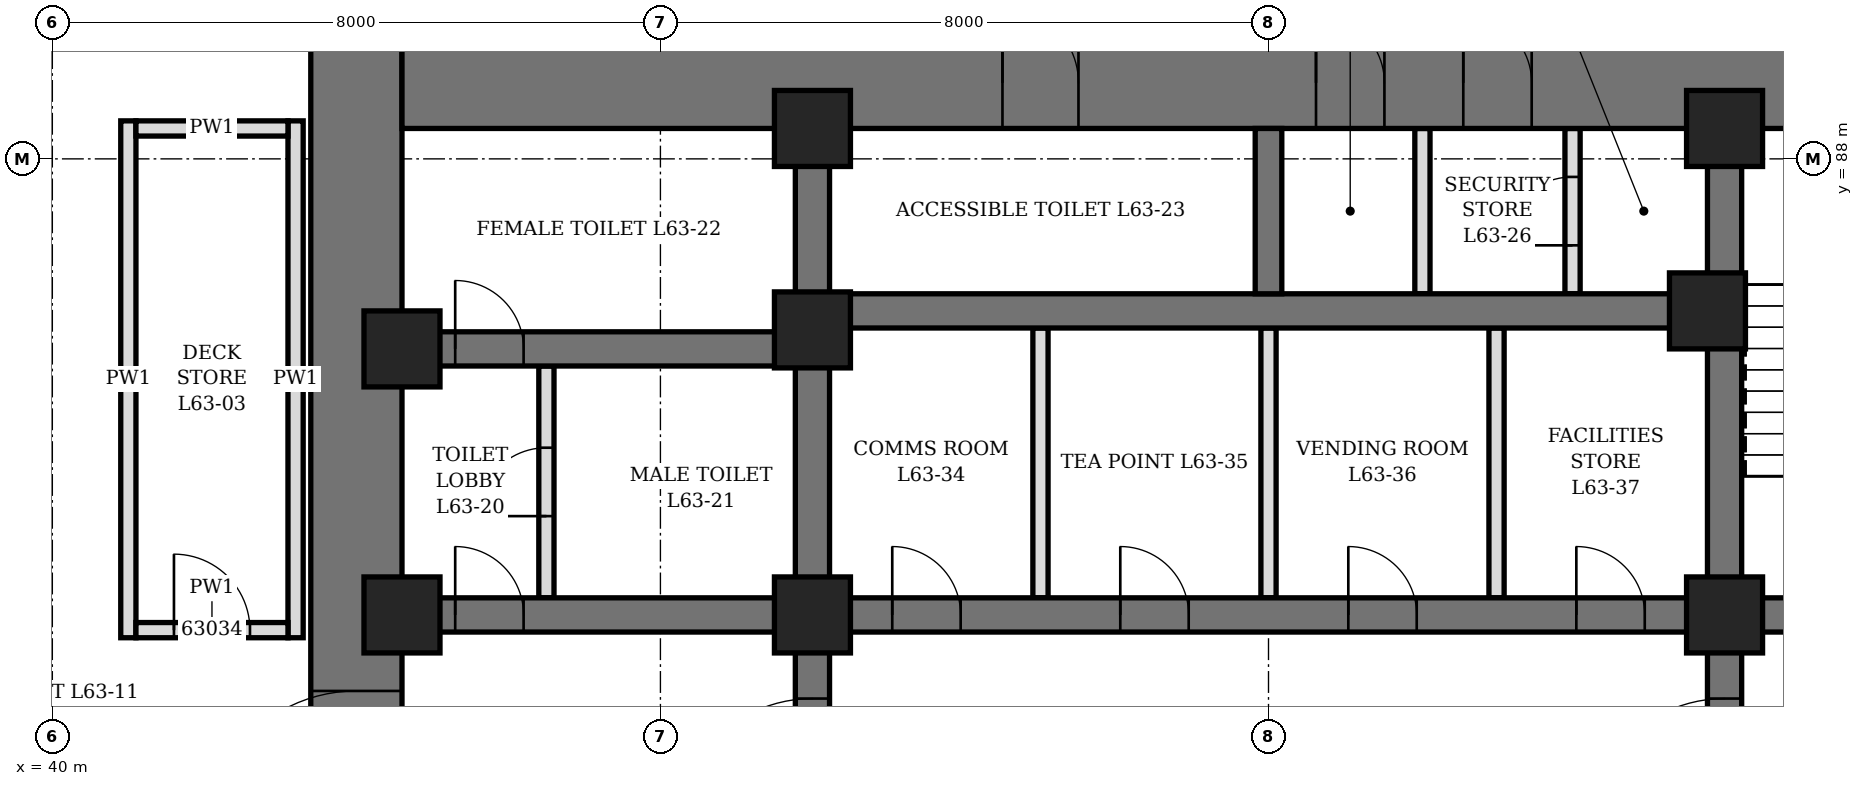
"""IFC4 building model, lengths in metres.
Left out: names, types, materials, properties, quantities, classifications, styles, units other than length and angle.
Written with IfcOpenShell. Run it as: python <this file> out.ifc"""

import sys

from ifc_helpers import new_model, si_unit, direction, frame, frame_2d, origin, origin_2d, place, context, subcontext, project, spatial, rectangle, hollow_rectangle, extrude, element, fill, save


model = new_model("IFC4")
c1 = context("Model", 3, precision=1e-05, world=origin(), true_north=direction((0.0, 1.0)))
c2 = subcontext(c1, "Body", "Model", "MODEL_VIEW")
j1 = project(units=[si_unit("LENGTHUNIT", "METRE"), si_unit("PLANEANGLEUNIT", "RADIAN")], contexts=[c1])
p1 = place(None, origin())
s1 = spatial("IfcSite", under=j1, at=p1, CompositionType="ELEMENT")
p2 = place(p1, origin())
s2 = spatial("IfcBuilding", under=s1, at=p2, CompositionType="ELEMENT")
p3 = place(p2, frame((0.0, 0.0, 279.7)))
s3 = spatial("IfcBuildingStorey", under=s2, at=p3, CompositionType="ELEMENT", Elevation=279.7)
p4 = place(p3, frame((44.0, 70.4, 0.0), z_axis=(0.0, 0.0, 1.0), x_axis=(0.0, 1.0, 0.0)))
e1 = element("IfcWall", 1, at=p4, inside=s3, PredefinedType="SHEAR", context=c2, shape_type="SweptSolid", body=[
    extrude(rectangle(XDim=19.2, YDim=1.2, at=frame_2d((9.6, 0.0))), origin(), (0.0, 0.0, 1.0), 6.0),
])
p5 = place(p4, frame((8.6, 0.0, 0.0)))
e2 = element("IfcOpeningElement", 2, at=p5, cuts=e1, PredefinedType="OPENING", context=c2, shape_type="SweptSolid", body=[
    extrude(rectangle(XDim=2.0, YDim=2.4, at=frame_2d((1.0, 1.2))), frame((0.0, 0.61, 0.0), z_axis=(0.0, -1.0, 0.0), x_axis=(1.0, 0.0, 0.0)), (0.0, 0.0, 1.0), 1.22),
])
p6 = place(p3, frame((44.6, 89.0, 0.0), z_axis=(0.0, 0.0, 1.0), x_axis=(1.0, 0.0, 0.0)))
e3 = element("IfcWall", 3, at=p6, inside=s3, PredefinedType="SHEAR", context=c2, shape_type="SweptSolid", body=[
    extrude(rectangle(XDim=22.8, YDim=1.2, at=frame_2d((11.4, 0.0))), origin(), (0.0, 0.0, 1.0), 6.0),
])
p7 = place(p6, frame((7.9, 0.0, 0.0)))
e4 = element("IfcOpeningElement", 4, at=p7, cuts=e3, PredefinedType="OPENING", context=c2, shape_type="SweptSolid", body=[
    extrude(rectangle(XDim=1.0, YDim=2.1, at=frame_2d((0.5, 1.05))), frame((0.0, 0.61, 0.0), z_axis=(0.0, -1.0, 0.0), x_axis=(1.0, 0.0, 0.0)), (0.0, 0.0, 1.0), 1.22),
])
p8 = place(p6, frame((12.025, 0.0, 0.0)))
e5 = element("IfcOpeningElement", 5, at=p8, cuts=e3, PredefinedType="OPENING", context=c2, shape_type="SweptSolid", body=[
    extrude(rectangle(XDim=0.9, YDim=2.1, at=frame_2d((0.45, 1.05))), frame((0.0, 0.61, 0.0), z_axis=(0.0, -1.0, 0.0), x_axis=(1.0, 0.0, 0.0)), (0.0, 0.0, 1.0), 1.22),
])
p9 = place(p6, frame((13.962, 0.0, 0.0)))
e6 = element("IfcOpeningElement", 6, at=p9, cuts=e3, PredefinedType="OPENING", context=c2, shape_type="SweptSolid", body=[
    extrude(rectangle(XDim=0.9, YDim=2.1, at=frame_2d((0.45, 1.05))), frame((0.0, 0.61, 0.0), z_axis=(0.0, -1.0, 0.0), x_axis=(1.0, 0.0, 0.0)), (0.0, 0.0, 1.0), 1.22),
])
p10 = place(p3, frame((50.0, 71.6, 0.0), z_axis=(0.0, 0.0, 1.0), x_axis=(0.0, 1.0, 0.0)))
e7 = element("IfcWall", 7, at=p10, inside=s3, PredefinedType="SHEAR", context=c2, shape_type="SweptSolid", body=[
    extrude(rectangle(XDim=16.8, YDim=0.45, at=frame_2d((8.4, 0.0))), origin(), (0.0, 0.0, 1.0), 6.0),
])
p11 = place(p10, frame((7.5, 0.0, 0.0)))
e8 = element("IfcOpeningElement", 8, at=p11, cuts=e7, PredefinedType="OPENING", context=c2, shape_type="SweptSolid", body=[
    extrude(rectangle(XDim=1.8, YDim=2.4, at=frame_2d((0.9, 1.2))), frame((0.0, 0.235, 0.0), z_axis=(0.0, -1.0, 0.0), x_axis=(1.0, 0.0, 0.0)), (0.0, 0.0, 1.0), 0.47),
])
p12 = place(p3, frame((62.0, 71.6, 0.0), z_axis=(0.0, 0.0, 1.0), x_axis=(0.0, 1.0, 0.0)))
e9 = element("IfcWall", 9, at=p12, inside=s3, PredefinedType="SHEAR", context=c2, shape_type="SweptSolid", body=[
    extrude(rectangle(XDim=16.8, YDim=0.45, at=frame_2d((8.4, 0.0))), origin(), (0.0, 0.0, 1.0), 6.0),
])
p13 = place(p12, frame((7.5, 0.0, 0.0)))
e10 = element("IfcOpeningElement", 10, at=p13, cuts=e9, PredefinedType="OPENING", context=c2, shape_type="SweptSolid", body=[
    extrude(rectangle(XDim=1.8, YDim=2.4, at=frame_2d((0.9, 1.2))), frame((0.0, 0.235, 0.0), z_axis=(0.0, -1.0, 0.0), x_axis=(1.0, 0.0, 0.0)), (0.0, 0.0, 1.0), 0.47),
])
p14 = place(p3, frame((44.6, 82.0, 0.0), z_axis=(0.0, 0.0, 1.0), x_axis=(1.0, 0.0, 0.0)))
e11 = element("IfcWall", 11, at=p14, inside=s3, PredefinedType="SHEAR", context=c2, shape_type="SweptSolid", body=[
    extrude(rectangle(XDim=5.175, YDim=0.45, at=frame_2d((2.587, 0.0))), origin(), (0.0, 0.0, 1.0), 6.0),
])
p15 = place(p14, frame((0.7, 0.0, 0.0)))
e12 = element("IfcOpeningElement", 12, at=p15, cuts=e11, PredefinedType="OPENING", context=c2, shape_type="SweptSolid", body=[
    extrude(rectangle(XDim=0.9, YDim=2.1, at=frame_2d((0.45, 1.05))), frame((0.0, 0.235, 0.0), z_axis=(0.0, -1.0, 0.0), x_axis=(1.0, 0.0, 0.0)), (0.0, 0.0, 1.0), 0.47),
])
p16 = place(p3, frame((44.6, 85.5, 0.0), z_axis=(0.0, 0.0, 1.0), x_axis=(1.0, 0.0, 0.0)))
e13 = element("IfcWall", 13, at=p16, inside=s3, PredefinedType="SHEAR", context=c2, shape_type="SweptSolid", body=[
    extrude(rectangle(XDim=5.175, YDim=0.45, at=frame_2d((2.587, 0.0))), origin(), (0.0, 0.0, 1.0), 6.0),
])
p17 = place(p16, frame((0.7, 0.0, 0.0)))
e14 = element("IfcOpeningElement", 14, at=p17, cuts=e13, PredefinedType="OPENING", context=c2, shape_type="SweptSolid", body=[
    extrude(rectangle(XDim=0.9, YDim=2.1, at=frame_2d((0.45, 1.05))), frame((0.0, 0.235, 0.0), z_axis=(0.0, -1.0, 0.0), x_axis=(1.0, 0.0, 0.0)), (0.0, 0.0, 1.0), 0.47),
])
p18 = place(p3, frame((62.225, 82.0, 0.0), z_axis=(0.0, 0.0, 1.0), x_axis=(1.0, 0.0, 0.0)))
e15 = element("IfcWall", 15, at=p18, inside=s3, PredefinedType="SHEAR", context=c2, shape_type="SweptSolid", body=[
    extrude(rectangle(XDim=5.175, YDim=0.45, at=frame_2d((2.587, 0.0))), origin(), (0.0, 0.0, 1.0), 6.0),
])
p19 = place(p18, frame((2.175, 0.0, 0.0)))
e16 = element("IfcOpeningElement", 16, at=p19, cuts=e15, PredefinedType="OPENING", context=c2, shape_type="SweptSolid", body=[
    extrude(rectangle(XDim=1.2, YDim=2.1, at=frame_2d((0.6, 1.05))), frame((0.0, 0.235, 0.0), z_axis=(0.0, -1.0, 0.0), x_axis=(1.0, 0.0, 0.0)), (0.0, 0.0, 1.0), 0.47),
])
p20 = place(p3, frame((50.225, 82.0, 0.0), z_axis=(0.0, 0.0, 1.0), x_axis=(1.0, 0.0, 0.0)))
e17 = element("IfcWall", 17, at=p20, inside=s3, PredefinedType="SHEAR", context=c2, shape_type="SweptSolid", body=[
    extrude(rectangle(XDim=11.55, YDim=0.45, at=frame_2d((5.775, 0.0))), origin(), (0.0, 0.0, 1.0), 6.0),
])
p21 = place(p20, frame((0.825, 0.0, 0.0)))
e18 = element("IfcOpeningElement", 18, at=p21, cuts=e17, PredefinedType="OPENING", context=c2, shape_type="SweptSolid", body=[
    extrude(rectangle(XDim=0.9, YDim=2.1, at=frame_2d((0.45, 1.05))), frame((0.0, 0.235, 0.0), z_axis=(0.0, -1.0, 0.0), x_axis=(1.0, 0.0, 0.0)), (0.0, 0.0, 1.0), 0.47),
])
p22 = place(p20, frame((3.825, 0.0, 0.0)))
e19 = element("IfcOpeningElement", 19, at=p22, cuts=e17, PredefinedType="OPENING", context=c2, shape_type="SweptSolid", body=[
    extrude(rectangle(XDim=0.9, YDim=2.1, at=frame_2d((0.45, 1.05))), frame((0.0, 0.235, 0.0), z_axis=(0.0, -1.0, 0.0), x_axis=(1.0, 0.0, 0.0)), (0.0, 0.0, 1.0), 0.47),
])
p23 = place(p20, frame((6.825, 0.0, 0.0)))
e20 = element("IfcOpeningElement", 20, at=p23, cuts=e17, PredefinedType="OPENING", context=c2, shape_type="SweptSolid", body=[
    extrude(rectangle(XDim=0.9, YDim=2.1, at=frame_2d((0.45, 1.05))), frame((0.0, 0.235, 0.0), z_axis=(0.0, -1.0, 0.0), x_axis=(1.0, 0.0, 0.0)), (0.0, 0.0, 1.0), 0.47),
])
p24 = place(p20, frame((9.825, 0.0, 0.0)))
e21 = element("IfcOpeningElement", 21, at=p24, cuts=e17, PredefinedType="OPENING", context=c2, shape_type="SweptSolid", body=[
    extrude(rectangle(XDim=0.9, YDim=2.1, at=frame_2d((0.45, 1.05))), frame((0.0, 0.235, 0.0), z_axis=(0.0, -1.0, 0.0), x_axis=(1.0, 0.0, 0.0)), (0.0, 0.0, 1.0), 0.47),
])
p25 = place(p3, frame((50.225, 86.0, 0.0), z_axis=(0.0, 0.0, 1.0), x_axis=(1.0, 0.0, 0.0)))
e22 = element("IfcWall", 22, at=p25, inside=s3, PredefinedType="SHEAR", context=c2, shape_type="SweptSolid", body=[
    extrude(rectangle(XDim=11.55, YDim=0.45, at=frame_2d((5.775, 0.0))), origin(), (0.0, 0.0, 1.0), 6.0),
])
p26 = place(p3, frame((56.0, 86.225, 0.0), z_axis=(0.0, 0.0, 1.0), x_axis=(0.0, 1.0, 0.0)))
e23 = element("IfcWall", 23, at=p26, inside=s3, PredefinedType="SHEAR", context=c2, shape_type="SweptSolid", body=[
    extrude(rectangle(XDim=2.175, YDim=0.35, at=frame_2d((1.087, 0.0))), origin(), (0.0, 0.0, 1.0), 6.0),
])
for number, where, z_axis, x_axis in (
    (24, (44.6, 82.0, 0.0), (0.0, 0.0, 1.0), (1.0, 0.0, 0.0)),
    (25, (44.6, 85.5, 0.0), (0.0, 0.0, 1.0), (1.0, 0.0, 0.0)),
    (26, (50.0, 82.0, 0.0), (0.0, 0.0, 1.0), (1.0, 0.0, 0.0)),
    (27, (50.0, 85.75, 0.0), (0.0, 0.0, 1.0), (1.0, 0.0, 0.0)),
    (28, (50.0, 88.4, 0.0), (0.0, 0.0, 1.0), (1.0, 0.0, 0.0)),
    (29, (61.775, 86.0, 0.0), (0.0, 0.0, 1.0), (1.0, 0.0, 0.0)),
    (30, (62.0, 82.0, 0.0), (0.0, 0.0, 1.0), (1.0, 0.0, 0.0)),
    (31, (62.0, 88.4, 0.0), (0.0, 0.0, 1.0), (1.0, 0.0, 0.0)),
):
    element("IfcColumn", number, at=place(p3, frame(where, z_axis=z_axis, x_axis=x_axis)), inside=s3, PredefinedType="COLUMN", context=c2, shape_type="SweptSolid", body=[
        extrude(hollow_rectangle(XDim=1.0, YDim=1.0, WallThickness=0.15, at=origin_2d()), origin(), (0.0, 0.0, 1.0), 6.0),
    ])
p27 = place(p3, frame((46.5, 82.225, 0.0), z_axis=(0.0, 0.0, 1.0), x_axis=(0.0, 1.0, 0.0)))
e32 = element("IfcWall", 32, at=p27, inside=s3, PredefinedType="PARTITIONING", context=c2, shape_type="SweptSolid", body=[
    extrude(rectangle(XDim=3.05, YDim=0.2, at=frame_2d((1.525, 0.0))), origin(), (0.0, 0.0, 1.0), 5.75),
])
p28 = place(p27, frame((1.075, 0.0, 0.0)))
e33 = element("IfcOpeningElement", 33, at=p28, cuts=e32, PredefinedType="OPENING", context=c2, shape_type="SweptSolid", body=[
    extrude(rectangle(XDim=0.9, YDim=2.1, at=frame_2d((0.45, 1.05))), frame((0.0, 0.11, 0.0), z_axis=(0.0, -1.0, 0.0), x_axis=(1.0, 0.0, 0.0)), (0.0, 0.0, 1.0), 0.22),
])
p29 = place(p3, frame((60.0, 86.225, 0.0), z_axis=(0.0, 0.0, 1.0), x_axis=(0.0, 1.0, 0.0)))
e34 = element("IfcWall", 34, at=p29, inside=s3, PredefinedType="PARTITIONING", context=c2, shape_type="SweptSolid", body=[
    extrude(rectangle(XDim=2.175, YDim=0.2, at=frame_2d((1.087, 0.0))), origin(), (0.0, 0.0, 1.0), 5.75),
])
p30 = place(p29, frame((0.637, 0.0, 0.0)))
e35 = element("IfcOpeningElement", 35, at=p30, cuts=e34, PredefinedType="OPENING", context=c2, shape_type="SweptSolid", body=[
    extrude(rectangle(XDim=0.9, YDim=2.1, at=frame_2d((0.45, 1.05))), frame((0.0, 0.11, 0.0), z_axis=(0.0, -1.0, 0.0), x_axis=(1.0, 0.0, 0.0)), (0.0, 0.0, 1.0), 0.22),
])
p31 = place(p3, frame((58.025, 86.225, 0.0), z_axis=(0.0, 0.0, 1.0), x_axis=(0.0, 1.0, 0.0)))
e36 = element("IfcWall", 36, at=p31, inside=s3, PredefinedType="PARTITIONING", context=c2, shape_type="SweptSolid", body=[
    extrude(rectangle(XDim=2.175, YDim=0.2, at=frame_2d((1.087, 0.0))), origin(), (0.0, 0.0, 1.0), 5.75),
])
p32 = place(p3, frame((53.0, 82.225, 0.0), z_axis=(0.0, 0.0, 1.0), x_axis=(0.0, 1.0, 0.0)))
e37 = element("IfcWall", 37, at=p32, inside=s3, PredefinedType="PARTITIONING", context=c2, shape_type="SweptSolid", body=[
    extrude(rectangle(XDim=3.55, YDim=0.2, at=frame_2d((1.775, 0.0))), origin(), (0.0, 0.0, 1.0), 5.75),
])
p33 = place(p3, frame((56.0, 82.225, 0.0), z_axis=(0.0, 0.0, 1.0), x_axis=(0.0, 1.0, 0.0)))
e38 = element("IfcWall", 38, at=p33, inside=s3, PredefinedType="PARTITIONING", context=c2, shape_type="SweptSolid", body=[
    extrude(rectangle(XDim=3.55, YDim=0.2, at=frame_2d((1.775, 0.0))), origin(), (0.0, 0.0, 1.0), 4.25),
])
p34 = place(p3, frame((59.0, 82.225, 0.0), z_axis=(0.0, 0.0, 1.0), x_axis=(0.0, 1.0, 0.0)))
e39 = element("IfcWall", 39, at=p34, inside=s3, PredefinedType="PARTITIONING", context=c2, shape_type="SweptSolid", body=[
    extrude(rectangle(XDim=3.55, YDim=0.2, at=frame_2d((1.775, 0.0))), origin(), (0.0, 0.0, 1.0), 5.75),
])
for number, where, z_axis, x_axis in (
    (40, (41.0, 81.7, 0.0), (0.0, 0.0, 1.0), (0.0, 1.0, 0.0)),
    (41, (43.2, 81.7, 0.0), (0.0, 0.0, 1.0), (0.0, 1.0, 0.0)),
):
    element("IfcWall", number, at=place(p3, frame(where, z_axis=z_axis, x_axis=x_axis)), inside=s3, PredefinedType="PARTITIONING", context=c2, shape_type="SweptSolid", body=[
        extrude(rectangle(XDim=6.8, YDim=0.2, at=frame_2d((3.4, 0.0))), origin(), (0.0, 0.0, 1.0), 5.75),
    ])
p35 = place(p3, frame((41.1, 81.8, 0.0), z_axis=(0.0, 0.0, 1.0), x_axis=(1.0, 0.0, 0.0)))
e42 = element("IfcWall", 42, at=p35, inside=s3, PredefinedType="PARTITIONING", context=c2, shape_type="SweptSolid", body=[
    extrude(rectangle(XDim=2.0, YDim=0.2, at=frame_2d((1.0, 0.0))), origin(), (0.0, 0.0, 1.0), 5.75),
])
p36 = place(p35, frame((0.5, 0.0, 0.0)))
e43 = element("IfcOpeningElement", 43, at=p36, cuts=e42, PredefinedType="OPENING", context=c2, shape_type="SweptSolid", body=[
    extrude(rectangle(XDim=1.0, YDim=2.1, at=frame_2d((0.5, 1.05))), frame((0.0, 0.11, 0.0), z_axis=(0.0, -1.0, 0.0), x_axis=(1.0, 0.0, 0.0)), (0.0, 0.0, 1.0), 0.22),
])
p37 = place(p3, frame((41.1, 88.4, 0.0), z_axis=(0.0, 0.0, 1.0), x_axis=(1.0, 0.0, 0.0)))
e44 = element("IfcWall", 44, at=p37, inside=s3, PredefinedType="PARTITIONING", context=c2, shape_type="SweptSolid", body=[
    extrude(rectangle(XDim=2.0, YDim=0.2, at=frame_2d((1.0, 0.0))), origin(), (0.0, 0.0, 1.0), 5.75),
])
p38 = place(p15, origin())
e45 = element("IfcDoor", 45, at=p38, inside=s3, OperationType="SINGLE_SWING_LEFT", PredefinedType="DOOR", context=c2, shape_type="SweptSolid", body=[
    extrude(rectangle(XDim=0.9, YDim=2.1, at=frame_2d((0.45, 1.05))), frame((0.0, 0.225, 0.0), z_axis=(0.0, -1.0, 0.0), x_axis=(1.0, 0.0, 0.0)), (0.0, 0.0, 1.0), 0.449),
])
fill(e12, e45)
p39 = place(p28, origin())
e46 = element("IfcDoor", 46, at=p39, inside=s3, OperationType="SINGLE_SWING_RIGHT", PredefinedType="DOOR", context=c2, shape_type="SweptSolid", body=[
    extrude(rectangle(XDim=0.9, YDim=2.1, at=frame_2d((0.45, 1.05))), frame((0.0, 0.1, 0.0), z_axis=(0.0, -1.0, 0.0), x_axis=(1.0, 0.0, 0.0)), (0.0, 0.0, 1.0), 0.199),
])
fill(e33, e46)
p40 = place(p17, origin())
e47 = element("IfcDoor", 47, at=p40, inside=s3, OperationType="SINGLE_SWING_RIGHT", PredefinedType="DOOR", context=c2, shape_type="SweptSolid", body=[
    extrude(rectangle(XDim=0.9, YDim=2.1, at=frame_2d((0.45, 1.05))), frame((0.0, 0.225, 0.0), z_axis=(0.0, -1.0, 0.0), x_axis=(1.0, 0.0, 0.0)), (0.0, 0.0, 1.0), 0.449),
])
fill(e14, e47)
p41 = place(p7, origin())
e48 = element("IfcDoor", 48, at=p41, inside=s3, OperationType="SINGLE_SWING_LEFT", PredefinedType="DOOR", context=c2, shape_type="SweptSolid", body=[
    extrude(rectangle(XDim=1.0, YDim=2.1, at=frame_2d((0.5, 1.05))), frame((0.0, 0.35, 0.0), z_axis=(0.0, -1.0, 0.0), x_axis=(1.0, 0.0, 0.0)), (0.0, 0.0, 1.0), 0.7),
])
fill(e4, e48)
p42 = place(p8, origin())
e49 = element("IfcDoor", 49, at=p42, inside=s3, OperationType="SINGLE_SWING_LEFT", PredefinedType="DOOR", context=c2, shape_type="SweptSolid", body=[
    extrude(rectangle(XDim=0.9, YDim=2.1, at=frame_2d((0.45, 1.05))), frame((0.0, 0.35, 0.0), z_axis=(0.0, -1.0, 0.0), x_axis=(1.0, 0.0, 0.0)), (0.0, 0.0, 1.0), 0.7),
])
fill(e5, e49)
p43 = place(p9, origin())
e50 = element("IfcDoor", 50, at=p43, inside=s3, OperationType="SINGLE_SWING_LEFT", PredefinedType="DOOR", context=c2, shape_type="SweptSolid", body=[
    extrude(rectangle(XDim=0.9, YDim=2.1, at=frame_2d((0.45, 1.05))), frame((0.0, 0.35, 0.0), z_axis=(0.0, -1.0, 0.0), x_axis=(1.0, 0.0, 0.0)), (0.0, 0.0, 1.0), 0.7),
])
fill(e6, e50)
p44 = place(p30, origin())
e51 = element("IfcDoor", 51, at=p44, inside=s3, OperationType="SINGLE_SWING_LEFT", PredefinedType="DOOR", context=c2, shape_type="SweptSolid", body=[
    extrude(rectangle(XDim=0.9, YDim=2.1, at=frame_2d((0.45, 1.05))), frame((0.0, 0.1, 0.0), z_axis=(0.0, -1.0, 0.0), x_axis=(1.0, 0.0, 0.0)), (0.0, 0.0, 1.0), 0.199),
])
fill(e35, e51)
p45 = place(p21, origin())
e52 = element("IfcDoor", 52, at=p45, inside=s3, OperationType="SINGLE_SWING_LEFT", PredefinedType="DOOR", context=c2, shape_type="SweptSolid", body=[
    extrude(rectangle(XDim=0.9, YDim=2.1, at=frame_2d((0.45, 1.05))), frame((0.0, 0.225, 0.0), z_axis=(0.0, -1.0, 0.0), x_axis=(1.0, 0.0, 0.0)), (0.0, 0.0, 1.0), 0.449),
])
fill(e18, e52)
p46 = place(p22, origin())
e53 = element("IfcDoor", 53, at=p46, inside=s3, OperationType="SINGLE_SWING_LEFT", PredefinedType="DOOR", context=c2, shape_type="SweptSolid", body=[
    extrude(rectangle(XDim=0.9, YDim=2.1, at=frame_2d((0.45, 1.05))), frame((0.0, 0.225, 0.0), z_axis=(0.0, -1.0, 0.0), x_axis=(1.0, 0.0, 0.0)), (0.0, 0.0, 1.0), 0.449),
])
fill(e19, e53)
p47 = place(p23, origin())
e54 = element("IfcDoor", 54, at=p47, inside=s3, OperationType="SINGLE_SWING_LEFT", PredefinedType="DOOR", context=c2, shape_type="SweptSolid", body=[
    extrude(rectangle(XDim=0.9, YDim=2.1, at=frame_2d((0.45, 1.05))), frame((0.0, 0.225, 0.0), z_axis=(0.0, -1.0, 0.0), x_axis=(1.0, 0.0, 0.0)), (0.0, 0.0, 1.0), 0.449),
])
fill(e20, e54)
p48 = place(p24, origin())
e55 = element("IfcDoor", 55, at=p48, inside=s3, OperationType="SINGLE_SWING_LEFT", PredefinedType="DOOR", context=c2, shape_type="SweptSolid", body=[
    extrude(rectangle(XDim=0.9, YDim=2.1, at=frame_2d((0.45, 1.05))), frame((0.0, 0.225, 0.0), z_axis=(0.0, -1.0, 0.0), x_axis=(1.0, 0.0, 0.0)), (0.0, 0.0, 1.0), 0.449),
])
fill(e21, e55)
p49 = place(p5, origin())
e56 = element("IfcDoor", 56, at=p49, inside=s3, OperationType="DOUBLE_DOOR_SINGLE_SWING", PredefinedType="DOOR", context=c2, shape_type="SweptSolid", body=[
    extrude(rectangle(XDim=2.0, YDim=2.4, at=frame_2d((1.0, 1.2))), frame((0.0, 0.35, 0.0), z_axis=(0.0, -1.0, 0.0), x_axis=(1.0, 0.0, 0.0)), (0.0, 0.0, 1.0), 0.7),
])
fill(e2, e56)
p50 = place(p11, origin())
e57 = element("IfcDoor", 57, at=p50, inside=s3, OperationType="DOUBLE_DOOR_SINGLE_SWING", PredefinedType="DOOR", context=c2, shape_type="SweptSolid", body=[
    extrude(rectangle(XDim=1.8, YDim=2.4, at=frame_2d((0.9, 1.2))), frame((0.0, 0.225, 0.0), z_axis=(0.0, -1.0, 0.0), x_axis=(1.0, 0.0, 0.0)), (0.0, 0.0, 1.0), 0.449),
])
fill(e8, e57)
p51 = place(p13, origin())
e58 = element("IfcDoor", 58, at=p51, inside=s3, OperationType="DOUBLE_DOOR_SINGLE_SWING", PredefinedType="DOOR", context=c2, shape_type="SweptSolid", body=[
    extrude(rectangle(XDim=1.8, YDim=2.4, at=frame_2d((0.9, 1.2))), frame((0.0, 0.225, 0.0), z_axis=(0.0, -1.0, 0.0), x_axis=(1.0, 0.0, 0.0)), (0.0, 0.0, 1.0), 0.449),
])
fill(e10, e58)
p52 = place(p36, origin())
e59 = element("IfcDoor", 59, at=p52, inside=s3, OperationType="SINGLE_SWING_LEFT", PredefinedType="DOOR", context=c2, shape_type="SweptSolid", body=[
    extrude(rectangle(XDim=1.0, YDim=2.1, at=frame_2d((0.5, 1.05))), frame((0.0, 0.1, 0.0), z_axis=(0.0, -1.0, 0.0), x_axis=(1.0, 0.0, 0.0)), (0.0, 0.0, 1.0), 0.199),
])
fill(e43, e59)
save(model, sys.argv[1])
